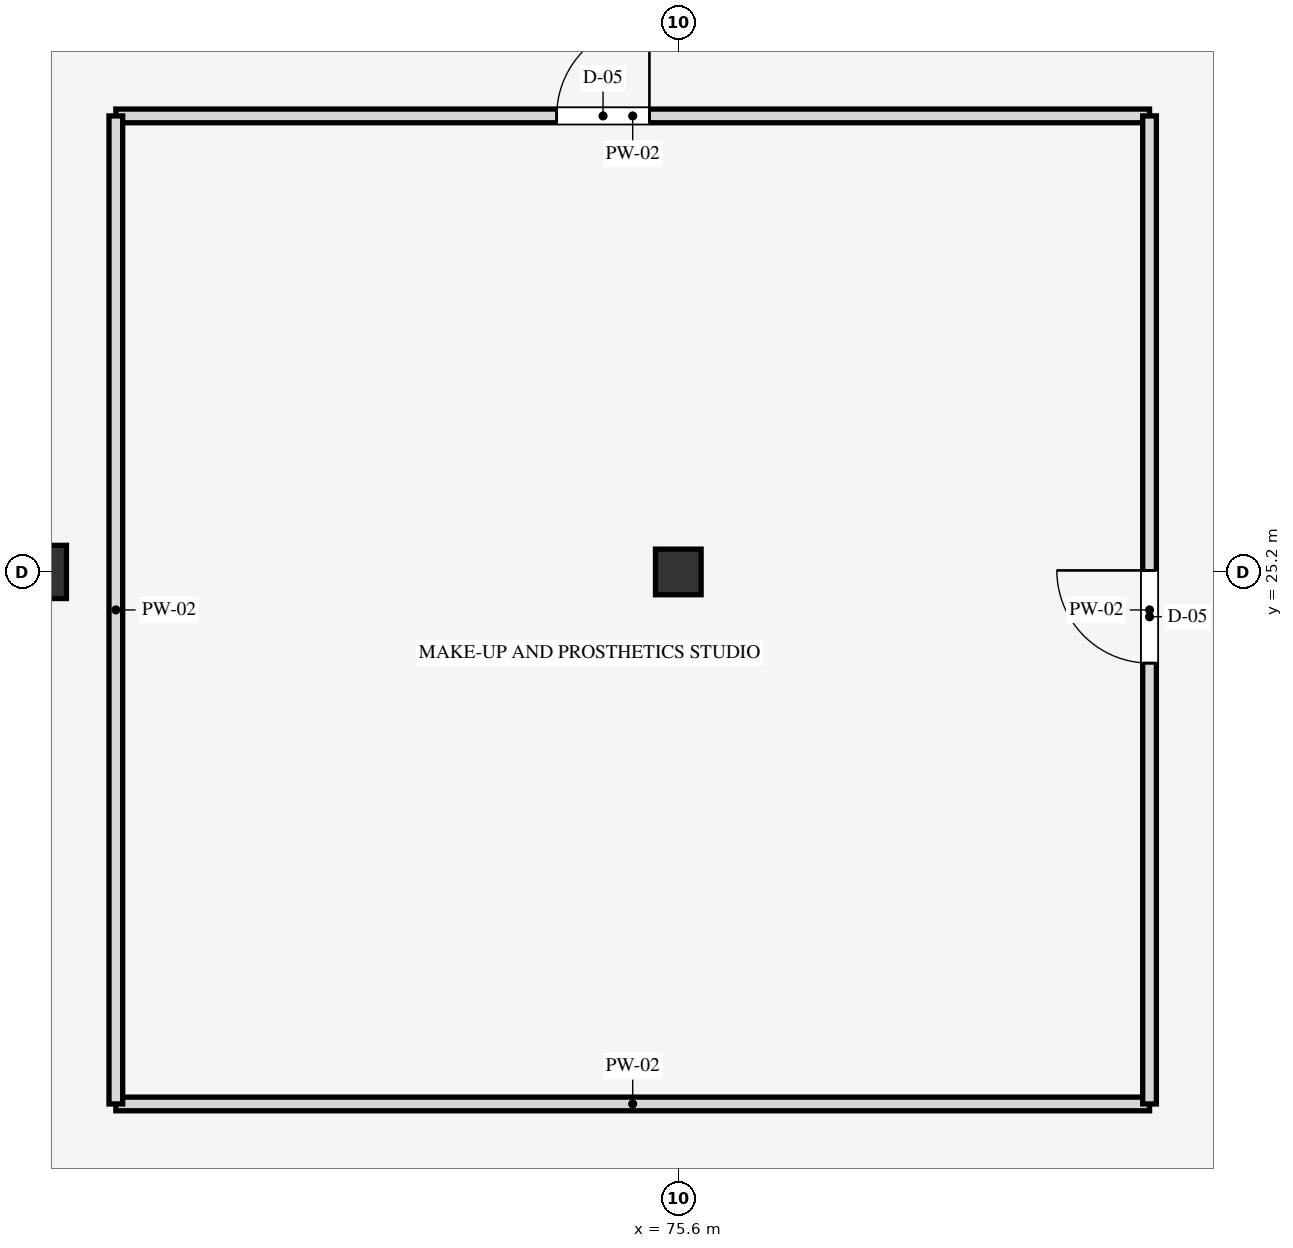
"""IFC4 building model, lengths in metres.
Left out: names, types, materials, properties, quantities, classifications, styles, units other than length and angle.
Written with IfcOpenShell. Run it as: python <this file> out.ifc"""

import sys

from ifc_helpers import new_model, si_unit, direction, frame, frame_2d, origin, origin_2d, place, context, subcontext, project, spatial, rectangle, extrude, element, fill, save


model = new_model("IFC4")
c1 = context("Model", 3, precision=1e-05, world=origin(), true_north=direction((0.0, 1.0)))
c2 = subcontext(c1, "Body", "Model", "MODEL_VIEW")
j1 = project(units=[si_unit("LENGTHUNIT", "METRE"), si_unit("PLANEANGLEUNIT", "RADIAN")], contexts=[c1])
p1 = place(None, origin())
s1 = spatial("IfcSite", under=j1, at=p1, CompositionType="ELEMENT")
p2 = place(p1, origin())
s2 = spatial("IfcBuilding", under=s1, at=p2, CompositionType="ELEMENT")
p3 = place(p2, frame((0.0, 0.0, 5.4)))
s3 = spatial("IfcBuildingStorey", under=s2, at=p3, CompositionType="ELEMENT", Elevation=5.4)
p4 = place(p3, frame((67.2, 25.2, 0.0), z_axis=(0.0, 0.0, 1.0), x_axis=(1.0, 0.0, 0.0)))
e1 = element("IfcColumn", 1, at=p4, inside=s3, PredefinedType="COLUMN", context=c2, shape_type="SweptSolid", body=[
    extrude(rectangle(XDim=0.7, YDim=0.7, at=origin_2d()), origin(), (0.0, 0.0, 1.0), 4.5),
])
p5 = place(p3, frame((75.6, 25.2, 0.0), z_axis=(0.0, 0.0, 1.0), x_axis=(1.0, 0.0, 0.0)))
e2 = element("IfcColumn", 2, at=p5, inside=s3, PredefinedType="COLUMN", context=c2, shape_type="SweptSolid", body=[
    extrude(rectangle(XDim=0.6, YDim=0.6, at=origin_2d()), origin(), (0.0, 0.0, 1.0), 4.5),
])
p6 = place(p3, frame((68.2, 18.2, 0.0), z_axis=(0.0, 0.0, 1.0), x_axis=(1.0, 0.0, 0.0)))
e3 = element("IfcWall", 3, at=p6, inside=s3, PredefinedType="PARTITIONING", context=c2, shape_type="SweptSolid", body=[
    extrude(rectangle(XDim=13.6, YDim=0.18, at=frame_2d((6.8, 0.0))), origin(), (0.0, 0.0, 1.0), 3.54),
])
p7 = place(p3, frame((68.2, 31.2, 0.0), z_axis=(0.0, 0.0, 1.0), x_axis=(1.0, 0.0, 0.0)))
e4 = element("IfcWall", 4, at=p7, inside=s3, PredefinedType="PARTITIONING", context=c2, shape_type="SweptSolid", body=[
    extrude(rectangle(XDim=13.6, YDim=0.18, at=frame_2d((6.8, 0.0))), origin(), (0.0, 0.0, 1.0), 3.54),
])
p8 = place(p7, frame((5.8, 0.0, 0.0)))
e5 = element("IfcOpeningElement", 5, at=p8, cuts=e4, PredefinedType="OPENING", context=c2, shape_type="SweptSolid", body=[
    extrude(rectangle(XDim=1.22, YDim=2.15, at=frame_2d((0.61, 1.075))), frame((0.0, 0.1, 0.0), z_axis=(0.0, -1.0, 0.0), x_axis=(1.0, 0.0, 0.0)), (0.0, 0.0, 1.0), 0.2),
])
p9 = place(p3, frame((68.2, 18.2, 0.0), z_axis=(0.0, 0.0, 1.0), x_axis=(0.0, 1.0, 0.0)))
e6 = element("IfcWall", 6, at=p9, inside=s3, PredefinedType="PARTITIONING", context=c2, shape_type="SweptSolid", body=[
    extrude(rectangle(XDim=13.0, YDim=0.18, at=frame_2d((6.5, 0.0))), origin(), (0.0, 0.0, 1.0), 3.54),
])
p10 = place(p3, frame((81.8, 18.2, 0.0), z_axis=(0.0, 0.0, 1.0), x_axis=(0.0, 1.0, 0.0)))
e7 = element("IfcWall", 7, at=p10, inside=s3, PredefinedType="PARTITIONING", context=c2, shape_type="SweptSolid", body=[
    extrude(rectangle(XDim=13.0, YDim=0.18, at=frame_2d((6.5, 0.0))), origin(), (0.0, 0.0, 1.0), 3.54),
])
p11 = place(p10, frame((5.8, 0.0, 0.0)))
e8 = element("IfcOpeningElement", 8, at=p11, cuts=e7, PredefinedType="OPENING", context=c2, shape_type="SweptSolid", body=[
    extrude(rectangle(XDim=1.22, YDim=2.15, at=frame_2d((0.61, 1.075))), frame((0.0, 0.1, 0.0), z_axis=(0.0, -1.0, 0.0), x_axis=(1.0, 0.0, 0.0)), (0.0, 0.0, 1.0), 0.2),
])
p12 = place(p8, origin())
e9 = element("IfcDoor", 9, at=p12, inside=s3, OperationType="SINGLE_SWING_RIGHT", PredefinedType="DOOR", context=c2, shape_type="SweptSolid", body=[
    extrude(rectangle(XDim=1.22, YDim=2.15, at=frame_2d((0.61, 1.075))), frame((0.0, 0.025, 0.0), z_axis=(0.0, -1.0, 0.0), x_axis=(1.0, 0.0, 0.0)), (0.0, 0.0, 1.0), 0.05),
])
fill(e5, e9)
p13 = place(p11, origin())
e10 = element("IfcDoor", 10, at=p13, inside=s3, OperationType="SINGLE_SWING_RIGHT", PredefinedType="DOOR", context=c2, shape_type="SweptSolid", body=[
    extrude(rectangle(XDim=1.22, YDim=2.15, at=frame_2d((0.61, 1.075))), frame((0.0, 0.025, 0.0), z_axis=(0.0, -1.0, 0.0), x_axis=(1.0, 0.0, 0.0)), (0.0, 0.0, 1.0), 0.05),
])
fill(e8, e10)
save(model, sys.argv[1])
